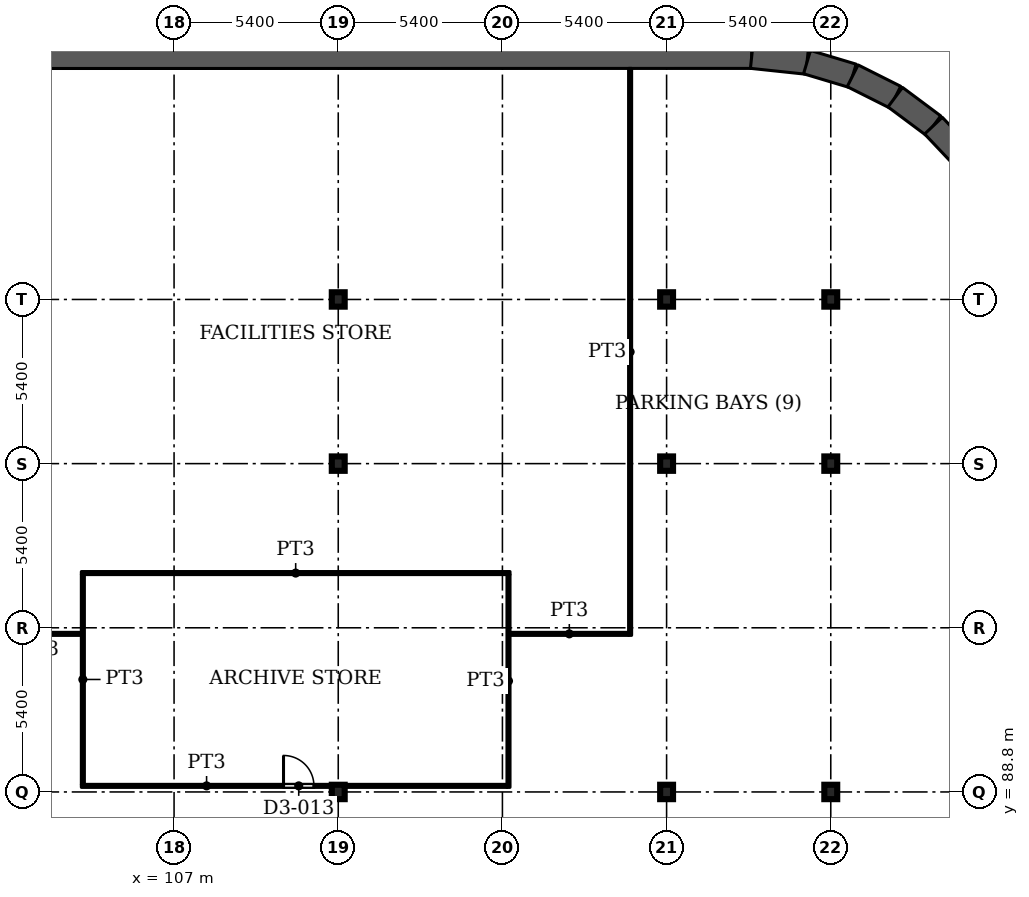
"""IFC4 building model, lengths in metres.
Left out: names, types, materials, properties, quantities, classifications, styles, units other than length and angle.
Written with IfcOpenShell. Run it as: python <this file> out.ifc"""

import sys

from ifc_helpers import new_model, si_unit, direction, frame, frame_2d, origin, origin_2d, place, context, subcontext, project, spatial, rectangle, i_section, extrude, source, transform, mapped, element, fill, save


model = new_model("IFC4")
c1 = context("Model", 3, precision=1e-05, world=origin(), true_north=direction((0.0, 1.0)))
c2 = subcontext(c1, "Body", "Model", "MODEL_VIEW")
j1 = project(units=[si_unit("LENGTHUNIT", "METRE"), si_unit("PLANEANGLEUNIT", "RADIAN")], contexts=[c1])
p1 = place(None, origin())
s1 = spatial("IfcSite", under=j1, at=p1, CompositionType="ELEMENT")
p2 = place(p1, origin())
s2 = spatial("IfcBuilding", under=s1, at=p2, CompositionType="ELEMENT")
p3 = place(p2, frame((0.0, 0.0, -15.0)))
s3 = spatial("IfcBuildingStorey", under=s2, at=p3, CompositionType="ELEMENT", Elevation=-15.0)
for number, where, z_axis, x_axis in (
    (1, (112.4, 88.8, 0.0), (0.0, 0.0, 1.0), (1.0, 0.0, 0.0)),
    (2, (123.2, 88.8, 0.0), (0.0, 0.0, 1.0), (1.0, 0.0, 0.0)),
    (3, (128.6, 88.8, 0.0), (0.0, 0.0, 1.0), (1.0, 0.0, 0.0)),
    (4, (112.4, 99.6, 0.0), (0.0, 0.0, 1.0), (1.0, 0.0, 0.0)),
    (5, (123.2, 99.6, 0.0), (0.0, 0.0, 1.0), (1.0, 0.0, 0.0)),
    (6, (128.6, 99.6, 0.0), (0.0, 0.0, 1.0), (1.0, 0.0, 0.0)),
    (7, (112.4, 105.0, 0.0), (0.0, 0.0, 1.0), (1.0, 0.0, 0.0)),
    (8, (123.2, 105.0, 0.0), (0.0, 0.0, 1.0), (1.0, 0.0, 0.0)),
    (9, (128.6, 105.0, 0.0), (0.0, 0.0, 1.0), (1.0, 0.0, 0.0)),
):
    element("IfcColumn", number, at=place(p3, frame(where, z_axis=z_axis, x_axis=x_axis)), inside=s3, PredefinedType="COLUMN", context=c2, shape_type="SweptSolid", body=[
        extrude(i_section(OverallWidth=0.424, OverallDepth=0.474, WebThickness=0.048, FlangeThickness=0.077, FilletRadius=0.014, at=origin_2d()), origin(), (0.0, 0.0, 1.0), 5.0),
    ])
p4 = place(p3, frame((17.739, 112.989, 0.0), z_axis=(0.0, 0.0, 1.0), x_axis=(0.999999994851, 0.000101480029, 0.0)))
e10 = element("IfcWall", 10, at=p4, inside=s3, PredefinedType="SOLIDWALL", context=c2, shape_type="SweptSolid", body=[
    extrude(rectangle(XDim=108.261, YDim=0.8, at=frame_2d((54.13, 0.0))), origin(), (0.0, 0.0, 1.0), 5.0),
])
p5 = place(p3, frame((126.0, 113.0, 0.0), z_axis=(0.0, 0.0, 1.0), x_axis=(0.994412187849, -0.105567043429, 0.0)))
e11 = element("IfcWall", 11, at=p5, inside=s3, PredefinedType="SOLIDWALL", context=c2, shape_type="SweptSolid", body=[
    extrude(rectangle(XDim=1.829, YDim=0.8, at=frame_2d((0.915, 0.0))), origin(), (0.0, 0.0, 1.0), 5.0),
])
p6 = place(p3, frame((127.819, 112.807, 0.0), z_axis=(0.0, 0.0, 1.0), x_axis=(0.957886299092, -0.287147763375, 0.0)))
e12 = element("IfcWall", 12, at=p6, inside=s3, PredefinedType="SOLIDWALL", context=c2, shape_type="SweptSolid", body=[
    extrude(rectangle(XDim=1.567, YDim=0.8, at=frame_2d((0.783, 0.0))), origin(), (0.0, 0.0, 1.0), 5.0),
])
p7 = place(p3, frame((129.32, 112.357, 0.0), z_axis=(0.0, 0.0, 1.0), x_axis=(0.893803246399, -0.448459314462, 0.0)))
e13 = element("IfcWall", 13, at=p7, inside=s3, PredefinedType="SOLIDWALL", context=c2, shape_type="SweptSolid", body=[
    extrude(rectangle(XDim=1.567, YDim=0.8, at=frame_2d((0.784, 0.0))), origin(), (0.0, 0.0, 1.0), 5.0),
])
p8 = place(p3, frame((130.721, 111.654, 0.0), z_axis=(0.0, 0.0, 1.0), x_axis=(0.801771638905, -0.597630520512, 0.0)))
e14 = element("IfcWall", 14, at=p8, inside=s3, PredefinedType="SOLIDWALL", context=c2, shape_type="SweptSolid", body=[
    extrude(rectangle(XDim=1.568, YDim=0.8, at=frame_2d((0.784, 0.0))), origin(), (0.0, 0.0, 1.0), 5.0),
])
p9 = place(p3, frame((131.978, 110.717, 0.0), z_axis=(0.0, 0.0, 1.0), x_axis=(0.686641833089, -0.726995868662, 0.0)))
e15 = element("IfcWall", 15, at=p9, inside=s3, PredefinedType="SOLIDWALL", context=c2, shape_type="SweptSolid", body=[
    extrude(rectangle(XDim=1.567, YDim=0.8, at=frame_2d((0.783, 0.0))), origin(), (0.0, 0.0, 1.0), 5.0),
])
p10 = place(p3, frame((100.125, 94.0, 0.0), z_axis=(0.0, 0.0, 1.0), x_axis=(1.0, 0.0, 0.0)))
e16 = element("IfcWall", 16, at=p10, inside=s3, PredefinedType="PARTITIONING", context=c2, shape_type="SweptSolid", body=[
    extrude(rectangle(XDim=3.825, YDim=0.1, at=frame_2d((1.913, 0.0))), origin(), (0.0, 0.0, 1.0), 4.68),
])
p11 = place(p3, frame((103.95, 89.0, 0.0), z_axis=(0.0, 0.0, 1.0), x_axis=(1.0, 0.0, 0.0)))
e17 = element("IfcWall", 17, at=p11, inside=s3, PredefinedType="PARTITIONING", context=c2, shape_type="SweptSolid", body=[
    extrude(rectangle(XDim=8.239, YDim=0.1, at=frame_2d((4.12, 0.0))), origin(), (0.0, 0.0, 1.0), 4.68),
])
p12 = place(p11, frame((6.65, 0.0, 0.0)))
e18 = element("IfcOpeningElement", 18, at=p12, cuts=e17, PredefinedType="OPENING", context=c2, shape_type="SweptSolid", body=[
    extrude(rectangle(XDim=1.0, YDim=2.1, at=frame_2d((0.5, 1.05))), frame((0.0, 0.06, 0.0), z_axis=(0.0, -1.0, 0.0), x_axis=(1.0, 0.0, 0.0)), (0.0, 0.0, 1.0), 0.12),
])
p13 = place(p3, frame((103.95, 96.0, 0.0), z_axis=(0.0, 0.0, 1.0), x_axis=(1.0, 0.0, 0.0)))
e19 = element("IfcWall", 19, at=p13, inside=s3, PredefinedType="PARTITIONING", context=c2, shape_type="SweptSolid", body=[
    extrude(rectangle(XDim=14.1, YDim=0.1, at=frame_2d((7.05, 0.0))), origin(), (0.0, 0.0, 1.0), 4.68),
])
p14 = place(p3, frame((104.0, 89.05, 0.0), z_axis=(0.0, 0.0, 1.0), x_axis=(0.0, 1.0, 0.0)))
e20 = element("IfcWall", 20, at=p14, inside=s3, PredefinedType="PARTITIONING", context=c2, shape_type="SweptSolid", body=[
    extrude(rectangle(XDim=6.9, YDim=0.1, at=frame_2d((3.45, 0.0))), origin(), (0.0, 0.0, 1.0), 4.68),
])
p15 = place(p3, frame((112.611, 89.0, 0.0), z_axis=(0.0, 0.0, 1.0), x_axis=(1.0, 0.0, 0.0)))
e21 = element("IfcWall", 21, at=p15, inside=s3, PredefinedType="PARTITIONING", context=c2, shape_type="SweptSolid", body=[
    extrude(rectangle(XDim=5.339, YDim=0.1, at=frame_2d((2.669, 0.0))), origin(), (0.0, 0.0, 1.0), 4.68),
])
p16 = place(p3, frame((118.0, 88.95, 0.0), z_axis=(0.0, 0.0, 1.0), x_axis=(0.0, 1.0, 0.0)))
e22 = element("IfcWall", 22, at=p16, inside=s3, PredefinedType="PARTITIONING", context=c2, shape_type="SweptSolid", body=[
    extrude(rectangle(XDim=7.0, YDim=0.1, at=frame_2d((3.5, 0.0))), origin(), (0.0, 0.0, 1.0), 4.68),
])
p17 = place(p3, frame((118.05, 94.0, 0.0), z_axis=(0.0, 0.0, 1.0), x_axis=(1.0, 0.0, 0.0)))
e23 = element("IfcWall", 23, at=p17, inside=s3, PredefinedType="PARTITIONING", context=c2, shape_type="SweptSolid", body=[
    extrude(rectangle(XDim=3.9, YDim=0.1, at=frame_2d((1.95, 0.0))), origin(), (0.0, 0.0, 1.0), 4.68),
])
p18 = place(p3, frame((122.0, 93.95, 0.0), z_axis=(0.0, 0.0, 1.0), x_axis=(0.0, 1.0, 0.0)))
e24 = element("IfcWall", 24, at=p18, inside=s3, PredefinedType="PARTITIONING", context=c2, shape_type="SweptSolid", body=[
    extrude(rectangle(XDim=18.651, YDim=0.1, at=frame_2d((9.326, 0.0))), origin(), (0.0, 0.0, 1.0), 4.68),
])
m1 = source(origin(), c2, "Body", "SweptSolid", [
    extrude(rectangle(XDim=1.0, YDim=2.1, at=frame_2d((0.5, 1.05))), frame((0.0, 0.025, 0.0), z_axis=(0.0, -1.0, 0.0), x_axis=(1.0, 0.0, 0.0)), (0.0, 0.0, 1.0), 0.05),
])
p19 = place(p12, origin())
e25 = element("IfcDoor", 25, at=p19, inside=s3, OperationType="SINGLE_SWING_LEFT", PredefinedType="DOOR", context=c2, shape_type="MappedRepresentation", body=[
    mapped(m1, transform((0.0, 0.0, 0.0), x_axis=(1.0, 0.0, 0.0), y_axis=(0.0, 1.0, 0.0), z_axis=(0.0, 0.0, 1.0), scale=1.0)),
])
fill(e18, e25)
save(model, sys.argv[1])
